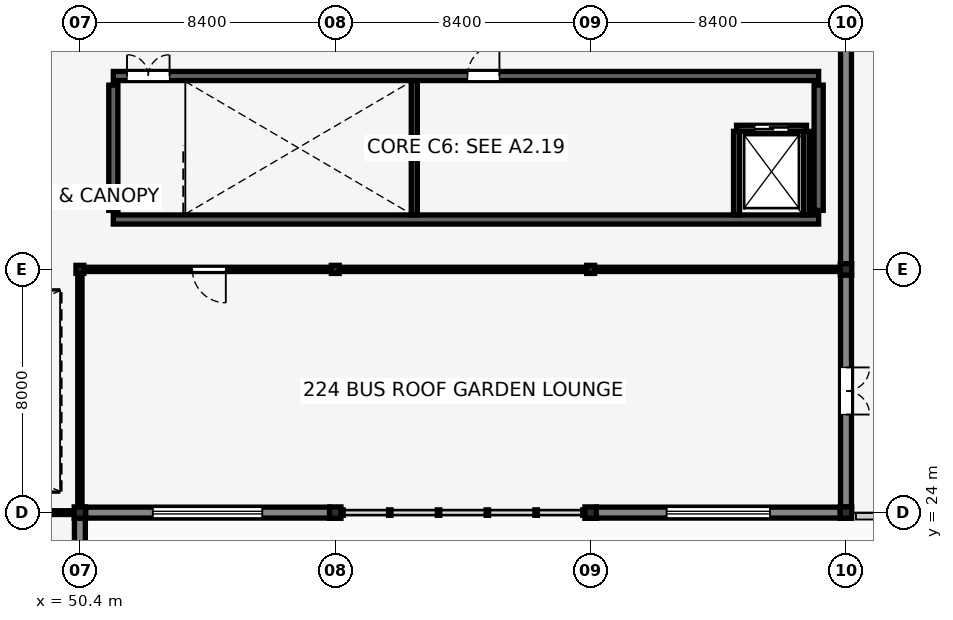
"""IFC4 building model, lengths in metres.
Left out: names, types, materials, properties, quantities, classifications, styles, units other than length and angle.
Written with IfcOpenShell. Run it as: python <this file> out.ifc"""

import sys

from ifc_helpers import new_model, si_unit, direction, frame, frame_2d, origin, origin_2d, place, context, subcontext, project, spatial, rectangle, i_section, extrude, element, fill, save


model = new_model("IFC4")
c1 = context("Model", 3, precision=1e-05, world=origin(), true_north=direction((0.0, 1.0)))
c2 = subcontext(c1, "Body", "Model", "MODEL_VIEW")
j1 = project(units=[si_unit("LENGTHUNIT", "METRE"), si_unit("PLANEANGLEUNIT", "RADIAN")], contexts=[c1])
p1 = place(None, origin())
s1 = spatial("IfcSite", under=j1, at=p1, CompositionType="ELEMENT")
p2 = place(p1, origin())
s2 = spatial("IfcBuilding", under=s1, at=p2, CompositionType="ELEMENT")
p3 = place(p2, frame((0.0, 0.0, 9.52)))
s3 = spatial("IfcBuildingStorey", under=s2, at=p3, CompositionType="ELEMENT", Elevation=9.52)
p4 = place(p3, frame((51.5, 33.64, 0.0), z_axis=(0.0, 0.0, 1.0), x_axis=(1.0, 0.0, 0.0)))
e1 = element("IfcWall", 1, at=p4, inside=s3, PredefinedType="SHEAR", context=c2, shape_type="SweptSolid", body=[
    extrude(rectangle(XDim=23.2, YDim=0.3, at=frame_2d((11.6, 0.0))), origin(), (0.0, 0.0, 1.0), 3.57),
])
p5 = place(p3, frame((51.5, 38.36, 0.0), z_axis=(0.0, 0.0, 1.0), x_axis=(1.0, 0.0, 0.0)))
e2 = element("IfcWall", 2, at=p5, inside=s3, PredefinedType="SHEAR", context=c2, shape_type="SweptSolid", body=[
    extrude(rectangle(XDim=23.2, YDim=0.3, at=frame_2d((11.6, 0.0))), origin(), (0.0, 0.0, 1.0), 3.57),
])
p6 = place(p5, frame((0.45, 0.0, 0.0), z_axis=(0.0, 0.0, 1.0), x_axis=(1.0, 0.0, 0.0)))
e3 = element("IfcOpeningElement", 3, at=p6, cuts=e2, PredefinedType="OPENING", context=c2, shape_type="SweptSolid", body=[
    extrude(rectangle(XDim=1.4, YDim=2.15, at=frame_2d((0.7, 1.075))), frame((0.0, 0.16, 0.0), z_axis=(0.0, -1.0, 0.0), x_axis=(1.0, 0.0, 0.0)), (0.0, 0.0, 1.0), 0.32),
])
p7 = place(p5, frame((11.65, 0.0, 0.0), z_axis=(0.0, 0.0, 1.0), x_axis=(1.0, 0.0, 0.0)))
e4 = element("IfcOpeningElement", 4, at=p7, cuts=e2, PredefinedType="OPENING", context=c2, shape_type="SweptSolid", body=[
    extrude(rectangle(XDim=1.05, YDim=2.15, at=frame_2d((0.525, 1.075))), frame((0.0, 0.16, 0.0), z_axis=(0.0, -1.0, 0.0), x_axis=(1.0, 0.0, 0.0)), (0.0, 0.0, 1.0), 0.32),
])
for number, where, z_axis, x_axis in (
    (5, (51.5, 33.94, 0.0), (0.0, 0.0, 1.0), (0.0, 1.0, 0.0)),
    (6, (74.7, 33.94, 0.0), (0.0, 0.0, 1.0), (0.0, 1.0, 0.0)),
):
    element("IfcWall", number, at=place(p3, frame(where, z_axis=z_axis, x_axis=x_axis)), inside=s3, PredefinedType="SHEAR", context=c2, shape_type="SweptSolid", body=[
        extrude(rectangle(XDim=4.12, YDim=0.3, at=frame_2d((2.06, 0.0))), origin(), (0.0, 0.0, 1.0), 3.57),
    ])
p8 = place(p3, frame((50.4, 24.0, 0.0), z_axis=(0.0, 0.0, 1.0), x_axis=(1.0, 0.0, 0.0)))
e7 = element("IfcColumn", 7, at=p8, inside=s3, PredefinedType="COLUMN", context=c2, shape_type="SweptSolid", body=[
    extrude(i_section(OverallWidth=0.375, OverallDepth=0.375, WebThickness=0.017, FlangeThickness=0.027, FilletRadius=0.015, at=origin_2d()), origin(), (0.0, 0.0, 1.0), 3.57),
])
p9 = place(p3, frame((50.4, 32.0, 0.0), z_axis=(0.0, 0.0, 1.0), x_axis=(1.0, 0.0, 0.0)))
e8 = element("IfcColumn", 8, at=p9, inside=s3, PredefinedType="COLUMN", context=c2, shape_type="SweptSolid", body=[
    extrude(i_section(OverallWidth=0.259, OverallDepth=0.267, WebThickness=0.013, FlangeThickness=0.021, FilletRadius=0.013, at=origin_2d()), origin(), (0.0, 0.0, 1.0), 6.275),
])
p10 = place(p3, frame((58.8, 24.0, 0.0), z_axis=(0.0, 0.0, 1.0), x_axis=(1.0, 0.0, 0.0)))
e9 = element("IfcColumn", 9, at=p10, inside=s3, PredefinedType="COLUMN", context=c2, shape_type="SweptSolid", body=[
    extrude(i_section(OverallWidth=0.375, OverallDepth=0.375, WebThickness=0.017, FlangeThickness=0.027, FilletRadius=0.015, at=origin_2d()), origin(), (0.0, 0.0, 1.0), 3.57),
])
p11 = place(p3, frame((58.8, 32.0, 0.0), z_axis=(0.0, 0.0, 1.0), x_axis=(1.0, 0.0, 0.0)))
e10 = element("IfcColumn", 10, at=p11, inside=s3, PredefinedType="COLUMN", context=c2, shape_type="SweptSolid", body=[
    extrude(i_section(OverallWidth=0.259, OverallDepth=0.267, WebThickness=0.013, FlangeThickness=0.021, FilletRadius=0.013, at=origin_2d()), origin(), (0.0, 0.0, 1.0), 3.57),
])
p12 = place(p3, frame((67.2, 24.0, 0.0), z_axis=(0.0, 0.0, 1.0), x_axis=(1.0, 0.0, 0.0)))
e11 = element("IfcColumn", 11, at=p12, inside=s3, PredefinedType="COLUMN", context=c2, shape_type="SweptSolid", body=[
    extrude(i_section(OverallWidth=0.375, OverallDepth=0.375, WebThickness=0.017, FlangeThickness=0.027, FilletRadius=0.015, at=origin_2d()), origin(), (0.0, 0.0, 1.0), 3.57),
])
p13 = place(p3, frame((67.2, 32.0, 0.0), z_axis=(0.0, 0.0, 1.0), x_axis=(1.0, 0.0, 0.0)))
e12 = element("IfcColumn", 12, at=p13, inside=s3, PredefinedType="COLUMN", context=c2, shape_type="SweptSolid", body=[
    extrude(i_section(OverallWidth=0.259, OverallDepth=0.267, WebThickness=0.013, FlangeThickness=0.021, FilletRadius=0.013, at=origin_2d()), origin(), (0.0, 0.0, 1.0), 3.57),
])
for number, where, z_axis, x_axis in (
    (13, (75.6, 24.0, 0.0), (0.0, 0.0, 1.0), (1.0, 0.0, 0.0)),
    (14, (75.6, 32.0, 0.0), (0.0, 0.0, 1.0), (1.0, 0.0, 0.0)),
):
    element("IfcColumn", number, at=place(p3, frame(where, z_axis=z_axis, x_axis=x_axis)), inside=s3, PredefinedType="COLUMN", context=c2, shape_type="SweptSolid", body=[
        extrude(i_section(OverallWidth=0.375, OverallDepth=0.375, WebThickness=0.017, FlangeThickness=0.027, FilletRadius=0.015, at=origin_2d()), origin(), (0.0, 0.0, 1.0), 3.57),
    ])
p14 = place(p3, frame((75.6, 24.187, 0.0), z_axis=(0.0, 0.0, 1.0), x_axis=(0.0, 1.0, 0.0)))
e15 = element("IfcWall", 15, at=p14, inside=s3, PredefinedType="SOLIDWALL", context=c2, shape_type="SweptSolid", body=[
    extrude(rectangle(XDim=7.625, YDim=0.36, at=frame_2d((3.813, 0.0))), origin(), (0.0, 0.0, 1.0), 3.219),
])
p15 = place(p14, frame((4.588, 0.0, 0.0), z_axis=(0.0, 0.0, 1.0), x_axis=(-1.0, 0.0, 0.0)))
e16 = element("IfcOpeningElement", 16, at=p15, cuts=e15, PredefinedType="OPENING", context=c2, shape_type="SweptSolid", body=[
    extrude(rectangle(XDim=1.55, YDim=2.2, at=frame_2d((0.775, 1.1))), frame((0.0, 0.19, 0.0), z_axis=(0.0, -1.0, 0.0), x_axis=(1.0, 0.0, 0.0)), (0.0, 0.0, 1.0), 0.38),
])
p16 = place(p3, frame((75.6, 32.187, 0.0), z_axis=(0.0, 0.0, 1.0), x_axis=(0.0, 1.0, 0.0)))
e17 = element("IfcWall", 17, at=p16, inside=s3, PredefinedType="SOLIDWALL", context=c2, shape_type="SweptSolid", body=[
    extrude(rectangle(XDim=7.625, YDim=0.36, at=frame_2d((3.813, 0.0))), origin(), (0.0, 0.0, 1.0), 3.27),
])
p17 = place(p3, frame((50.587, 24.0, 0.0), z_axis=(0.0, 0.0, 1.0), x_axis=(1.0, 0.0, 0.0)))
e18 = element("IfcWall", 18, at=p17, inside=s3, PredefinedType="SOLIDWALL", context=c2, shape_type="SweptSolid", body=[
    extrude(rectangle(XDim=8.025, YDim=0.36, at=frame_2d((4.013, 0.0))), origin(), (0.0, 0.0, 1.0), 3.27),
])
p18 = place(p17, frame((2.213, 0.0, 0.9), z_axis=(0.0, 0.0, 1.0), x_axis=(1.0, 0.0, 0.0)))
e19 = element("IfcOpeningElement", 19, at=p18, cuts=e18, PredefinedType="OPENING", context=c2, shape_type="SweptSolid", body=[
    extrude(rectangle(XDim=3.6, YDim=1.8, at=frame_2d((1.8, 0.9))), frame((0.0, 0.19, 0.0), z_axis=(0.0, -1.0, 0.0), x_axis=(1.0, 0.0, 0.0)), (0.0, 0.0, 1.0), 0.38),
])
p19 = place(p3, frame((67.387, 24.0, 0.0), z_axis=(0.0, 0.0, 1.0), x_axis=(1.0, 0.0, 0.0)))
e20 = element("IfcWall", 20, at=p19, inside=s3, PredefinedType="SOLIDWALL", context=c2, shape_type="SweptSolid", body=[
    extrude(rectangle(XDim=8.025, YDim=0.36, at=frame_2d((4.013, 0.0))), origin(), (0.0, 0.0, 1.0), 3.27),
])
p20 = place(p19, frame((2.313, 0.0, 0.9), z_axis=(0.0, 0.0, 1.0), x_axis=(1.0, 0.0, 0.0)))
e21 = element("IfcOpeningElement", 21, at=p20, cuts=e20, PredefinedType="OPENING", context=c2, shape_type="SweptSolid", body=[
    extrude(rectangle(XDim=3.4, YDim=1.7, at=frame_2d((1.7, 0.85))), frame((0.0, 0.19, 0.0), z_axis=(0.0, -1.0, 0.0), x_axis=(1.0, 0.0, 0.0)), (0.0, 0.0, 1.0), 0.38),
])
p21 = place(p3, frame((50.4, 16.187, 0.0), z_axis=(0.0, 0.0, 1.0), x_axis=(0.0, 1.0, 0.0)))
e22 = element("IfcWall", 22, at=p21, inside=s3, PredefinedType="SOLIDWALL", context=c2, shape_type="SweptSolid", body=[
    extrude(rectangle(XDim=7.625, YDim=0.36, at=frame_2d((3.813, 0.0))), origin(), (0.0, 0.0, 1.0), 3.57),
])
p22 = place(p21, frame((2.213, 0.0, 0.9), z_axis=(0.0, 0.0, 1.0), x_axis=(1.0, 0.0, 0.0)))
e23 = element("IfcOpeningElement", 23, at=p22, cuts=e22, PredefinedType="OPENING", context=c2, shape_type="SweptSolid", body=[
    extrude(rectangle(XDim=3.2, YDim=1.65, at=frame_2d((1.6, 0.825))), frame((0.0, 0.19, 0.0), z_axis=(0.0, -1.0, 0.0), x_axis=(1.0, 0.0, 0.0)), (0.0, 0.0, 1.0), 0.38),
])
p23 = place(p3, frame((75.928, 23.88, 0.0), z_axis=(0.0, 0.0, 1.0), x_axis=(1.0, 0.0, 0.0)))
e24 = element("IfcWall", 24, at=p23, inside=s3, PredefinedType="PARAPET", context=c2, shape_type="SweptSolid", body=[
    extrude(rectangle(XDim=41.672, YDim=0.215, at=frame_2d((20.836, 0.0))), origin(), (0.0, 0.0, 1.0), 1.05),
])
p24 = place(p3, frame((61.4, 33.79, 0.0), z_axis=(0.0, 0.0, 1.0), x_axis=(0.0, 1.0, 0.0)))
e25 = element("IfcWall", 25, at=p24, inside=s3, PredefinedType="SHEAR", context=c2, shape_type="SweptSolid", body=[
    extrude(rectangle(XDim=4.42, YDim=0.2, at=frame_2d((2.21, 0.0))), origin(), (0.0, 0.0, 1.0), 3.57),
])
p25 = place(p3, frame((72.0, 36.64, 0.0), z_axis=(0.0, 0.0, 1.0), x_axis=(1.0, 0.0, 0.0)))
e26 = element("IfcWall", 26, at=p25, inside=s3, PredefinedType="SHEAR", context=c2, shape_type="SweptSolid", body=[
    extrude(rectangle(XDim=2.3, YDim=0.2, at=frame_2d((1.15, 0.0))), origin(), (0.0, 0.0, 1.0), 3.57),
])
p26 = place(p25, frame((0.6, 0.0, 0.0), z_axis=(0.0, 0.0, 1.0), x_axis=(1.0, 0.0, 0.0)))
e27 = element("IfcOpeningElement", 27, at=p26, cuts=e26, PredefinedType="OPENING", context=c2, shape_type="SweptSolid", body=[
    extrude(rectangle(XDim=1.1, YDim=2.15, at=frame_2d((0.55, 1.075))), frame((0.0, 0.11, 0.0), z_axis=(0.0, -1.0, 0.0), x_axis=(1.0, 0.0, 0.0)), (0.0, 0.0, 1.0), 0.22),
])
for number, where, z_axis, x_axis in (
    (28, (72.0, 33.79, 0.0), (0.0, 0.0, 1.0), (0.0, 1.0, 0.0)),
    (29, (74.3, 33.79, 0.0), (0.0, 0.0, 1.0), (0.0, 1.0, 0.0)),
):
    element("IfcWall", number, at=place(p3, frame(where, z_axis=z_axis, x_axis=x_axis)), inside=s3, PredefinedType="SHEAR", context=c2, shape_type="SweptSolid", body=[
        extrude(rectangle(XDim=2.75, YDim=0.2, at=frame_2d((1.375, 0.0))), origin(), (0.0, 0.0, 1.0), 3.57),
    ])
p27 = place(p3, frame((50.519, 32.0, 0.0), z_axis=(0.0, 0.0, 1.0), x_axis=(1.0, 0.0, 0.0)))
e30 = element("IfcWall", 30, at=p27, inside=s3, PredefinedType="PARTITIONING", context=c2, shape_type="SweptSolid", body=[
    extrude(rectangle(XDim=8.161, YDim=0.14, at=frame_2d((4.081, 0.0))), origin(), (0.0, 0.0, 1.0), 3.037),
])
p28 = place(p27, frame((4.681, 0.0, 0.0), z_axis=(0.0, 0.0, 1.0), x_axis=(-1.0, 0.0, 0.0)))
e31 = element("IfcOpeningElement", 31, at=p28, cuts=e30, PredefinedType="OPENING", context=c2, shape_type="SweptSolid", body=[
    extrude(rectangle(XDim=1.1, YDim=2.2, at=frame_2d((0.55, 1.1))), frame((0.0, 0.08, 0.0), z_axis=(0.0, -1.0, 0.0), x_axis=(1.0, 0.0, 0.0)), (0.0, 0.0, 1.0), 0.16),
])
p29 = place(p3, frame((58.919, 32.0, 0.0), z_axis=(0.0, 0.0, 1.0), x_axis=(1.0, 0.0, 0.0)))
e32 = element("IfcWall", 32, at=p29, inside=s3, PredefinedType="PARTITIONING", context=c2, shape_type="SweptSolid", body=[
    extrude(rectangle(XDim=8.161, YDim=0.14, at=frame_2d((4.081, 0.0))), origin(), (0.0, 0.0, 1.0), 3.037),
])
p30 = place(p3, frame((67.319, 32.0, 0.0), z_axis=(0.0, 0.0, 1.0), x_axis=(1.0, 0.0, 0.0)))
e33 = element("IfcWall", 33, at=p30, inside=s3, PredefinedType="PARTITIONING", context=c2, shape_type="SweptSolid", body=[
    extrude(rectangle(XDim=8.103, YDim=0.14, at=frame_2d((4.052, 0.0))), origin(), (0.0, 0.0, 1.0), 3.037),
])
p31 = place(p3, frame((50.4, 24.177, 0.0), z_axis=(0.0, 0.0, 1.0), x_axis=(0.0, 1.0, 0.0)))
e34 = element("IfcWall", 34, at=p31, inside=s3, PredefinedType="PARTITIONING", context=c2, shape_type="SweptSolid", body=[
    extrude(rectangle(XDim=7.699, YDim=0.14, at=frame_2d((3.85, 0.0))), origin(), (0.0, 0.0, 1.0), 3.27),
])
p32 = place(p3, frame((42.119, 24.0, 0.0), z_axis=(0.0, 0.0, 1.0), x_axis=(1.0, 0.0, 0.0)))
e35 = element("IfcWall", 35, at=p32, inside=s3, PredefinedType="PARTITIONING", context=c2, shape_type="SweptSolid", body=[
    extrude(rectangle(XDim=8.103, YDim=0.125, at=frame_2d((4.052, 0.0))), origin(), (0.0, 0.0, 1.0), 3.57),
])
p33 = place(p15, origin())
e36 = element("IfcDoor", 36, at=p33, inside=s3, OperationType="DOUBLE_DOOR_SINGLE_SWING", PredefinedType="DOOR", context=c2, shape_type="SweptSolid", body=[
    extrude(rectangle(XDim=1.55, YDim=2.2, at=frame_2d((0.775, 1.1))), frame((0.0, 0.025, 0.0), z_axis=(0.0, -1.0, 0.0), x_axis=(1.0, 0.0, 0.0)), (0.0, 0.0, 1.0), 0.05),
])
fill(e16, e36)
p34 = place(p18, origin())
e37 = element("IfcWindow", 37, at=p34, inside=s3, PartitioningType="TRIPLE_PANEL_VERTICAL", PredefinedType="WINDOW", context=c2, shape_type="SweptSolid", body=[
    extrude(rectangle(XDim=3.6, YDim=1.8, at=frame_2d((1.8, 0.9))), frame((0.0, 0.03, 0.0), z_axis=(0.0, -1.0, 0.0), x_axis=(1.0, 0.0, 0.0)), (0.0, 0.0, 1.0), 0.06),
])
fill(e19, e37)
p35 = place(p20, origin())
e38 = element("IfcWindow", 38, at=p35, inside=s3, PartitioningType="TRIPLE_PANEL_VERTICAL", PredefinedType="WINDOW", context=c2, shape_type="SweptSolid", body=[
    extrude(rectangle(XDim=3.4, YDim=1.7, at=frame_2d((1.7, 0.85))), frame((0.0, 0.03, 0.0), z_axis=(0.0, -1.0, 0.0), x_axis=(1.0, 0.0, 0.0)), (0.0, 0.0, 1.0), 0.06),
])
fill(e21, e38)
p36 = place(p6, origin())
e39 = element("IfcDoor", 39, at=p36, inside=s3, OperationType="DOUBLE_DOOR_SINGLE_SWING", PredefinedType="DOOR", context=c2, shape_type="SweptSolid", body=[
    extrude(rectangle(XDim=1.4, YDim=2.15, at=frame_2d((0.7, 1.075))), frame((0.0, 0.025, 0.0), z_axis=(0.0, -1.0, 0.0), x_axis=(1.0, 0.0, 0.0)), (0.0, 0.0, 1.0), 0.05),
])
fill(e3, e39)
p37 = place(p7, origin())
e40 = element("IfcDoor", 40, at=p37, inside=s3, OperationType="SINGLE_SWING_RIGHT", PredefinedType="DOOR", context=c2, shape_type="SweptSolid", body=[
    extrude(rectangle(XDim=1.05, YDim=2.15, at=frame_2d((0.525, 1.075))), frame((0.0, 0.025, 0.0), z_axis=(0.0, -1.0, 0.0), x_axis=(1.0, 0.0, 0.0)), (0.0, 0.0, 1.0), 0.05),
])
fill(e4, e40)
p38 = place(p26, origin())
e41 = element("IfcDoor", 41, at=p38, inside=s3, OperationType="DOUBLE_DOOR_SLIDING", PredefinedType="DOOR", context=c2, shape_type="SweptSolid", body=[
    extrude(rectangle(XDim=1.1, YDim=2.15, at=frame_2d((0.55, 1.075))), frame((0.0, 0.025, 0.0), z_axis=(0.0, -1.0, 0.0), x_axis=(1.0, 0.0, 0.0)), (0.0, 0.0, 1.0), 0.05),
])
fill(e27, e41)
p39 = place(p28, origin())
e42 = element("IfcDoor", 42, at=p39, inside=s3, OperationType="SINGLE_SWING_LEFT", PredefinedType="DOOR", context=c2, shape_type="SweptSolid", body=[
    extrude(rectangle(XDim=1.1, YDim=2.2, at=frame_2d((0.55, 1.1))), frame((0.0, 0.025, 0.0), z_axis=(0.0, -1.0, 0.0), x_axis=(1.0, 0.0, 0.0)), (0.0, 0.0, 1.0), 0.05),
])
fill(e31, e42)
save(model, sys.argv[1])
